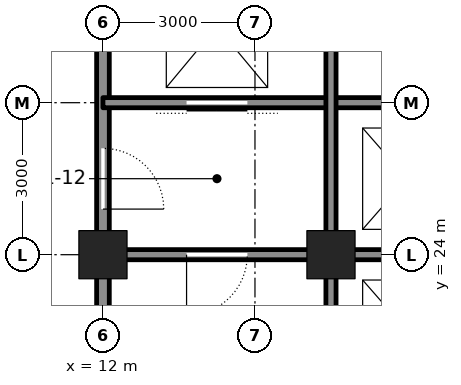
"""IFC4 building model, lengths in metres.
Left out: names, types, materials, properties, quantities, classifications, styles, units other than length and angle.
Written with IfcOpenShell. Run it as: python <this file> out.ifc"""

import sys

from ifc_helpers import new_model, si_unit, direction, frame, frame_2d, origin, origin_2d, place, context, subcontext, project, spatial, rectangle, hollow_rectangle, extrude, element, fill, save


model = new_model("IFC4")
c1 = context("Model", 3, precision=1e-05, world=origin(), true_north=direction((0.0, 1.0)))
c2 = subcontext(c1, "Body", "Model", "MODEL_VIEW")
j1 = project(units=[si_unit("LENGTHUNIT", "METRE"), si_unit("PLANEANGLEUNIT", "RADIAN")], contexts=[c1])
p1 = place(None, origin())
s1 = spatial("IfcSite", under=j1, at=p1, CompositionType="ELEMENT")
p2 = place(p1, origin())
s2 = spatial("IfcBuilding", under=s1, at=p2, CompositionType="ELEMENT")
p3 = place(p2, frame((0.0, 0.0, 6.0)))
s3 = spatial("IfcBuildingStorey", under=s2, at=p3, CompositionType="ELEMENT", Elevation=6.0)
for number, where, z_axis, x_axis in (
    (1, (12.0, 24.0, 0.0), (0.0, 0.0, 1.0), (1.0, 0.0, 0.0)),
    (2, (16.5, 24.0, 0.0), (0.0, 0.0, 1.0), (1.0, 0.0, 0.0)),
):
    element("IfcColumn", number, at=place(p3, frame(where, z_axis=z_axis, x_axis=x_axis)), inside=s3, PredefinedType="COLUMN", context=c2, shape_type="SweptSolid", body=[
        extrude(hollow_rectangle(XDim=0.95, YDim=0.95, WallThickness=0.095, at=origin_2d()), origin(), (0.0, 0.0, 1.0), 7.5),
    ])
p4 = place(p3, frame((12.0, 21.25, 0.0), z_axis=(0.0, 0.0, 1.0), x_axis=(0.0, 1.0, 0.0)))
e3 = element("IfcWall", 3, at=p4, inside=s3, PredefinedType="SOLIDWALL", context=c2, shape_type="SweptSolid", body=[
    extrude(rectangle(XDim=2.5, YDim=0.25, at=frame_2d((1.25, 0.0))), origin(), (0.0, 0.0, 1.0), 6.373),
])
p5 = place(p3, frame((12.0, 24.25, 0.0), z_axis=(0.0, 0.0, 1.0), x_axis=(0.0, 1.0, 0.0)))
e4 = element("IfcWall", 4, at=p5, inside=s3, PredefinedType="SOLIDWALL", context=c2, shape_type="SweptSolid", body=[
    extrude(rectangle(XDim=8.5, YDim=0.25, at=frame_2d((4.25, 0.0))), origin(), (0.0, 0.0, 1.0), 6.373),
])
p6 = place(p5, frame((0.65, 0.0, 0.0)))
e5 = element("IfcOpeningElement", 5, at=p6, cuts=e4, PredefinedType="OPENING", context=c2, shape_type="SweptSolid", body=[
    extrude(rectangle(XDim=1.2, YDim=2.1, at=frame_2d((0.6, 1.05))), frame((0.0, 0.135, 0.0), z_axis=(0.0, -1.0, 0.0), x_axis=(1.0, 0.0, 0.0)), (0.0, 0.0, 1.0), 0.27),
])
p7 = place(p5, frame((6.875, 0.0, 0.0)))
e6 = element("IfcOpeningElement", 6, at=p7, cuts=e4, PredefinedType="OPENING", context=c2, shape_type="SweptSolid", body=[
    extrude(rectangle(XDim=0.75, YDim=2.1, at=frame_2d((0.375, 1.05))), frame((0.0, 0.135, 0.0), z_axis=(0.0, -1.0, 0.0), x_axis=(1.0, 0.0, 0.0)), (0.0, 0.0, 1.0), 0.27),
])
p8 = place(p3, frame((12.25, 24.0, 0.0), z_axis=(0.0, 0.0, 1.0), x_axis=(1.0, 0.0, 0.0)))
e7 = element("IfcWall", 7, at=p8, inside=s3, PredefinedType="SOLIDWALL", context=c2, shape_type="SweptSolid", body=[
    extrude(rectangle(XDim=4.0, YDim=0.2, at=frame_2d((2.0, 0.0))), origin(), (0.0, 0.0, 1.0), 6.35),
])
p9 = place(p8, frame((1.4, 0.0, 0.0)))
e8 = element("IfcOpeningElement", 8, at=p9, cuts=e7, PredefinedType="OPENING", context=c2, shape_type="SweptSolid", body=[
    extrude(rectangle(XDim=1.2, YDim=2.1, at=frame_2d((0.6, 1.05))), frame((0.0, 0.11, 0.0), z_axis=(0.0, -1.0, 0.0), x_axis=(1.0, 0.0, 0.0)), (0.0, 0.0, 1.0), 0.22),
])
p10 = place(p3, frame((16.75, 24.0, 0.0), z_axis=(0.0, 0.0, 1.0), x_axis=(1.0, 0.0, 0.0)))
e9 = element("IfcWall", 9, at=p10, inside=s3, PredefinedType="SOLIDWALL", context=c2, shape_type="SweptSolid", body=[
    extrude(rectangle(XDim=2.75, YDim=0.2, at=frame_2d((1.375, 0.0))), origin(), (0.0, 0.0, 1.0), 6.35),
])
p11 = place(p3, frame((12.0, 27.0, 0.0), z_axis=(0.0, 0.0, 1.0), x_axis=(1.0, 0.0, 0.0)))
e10 = element("IfcWall", 10, at=p11, inside=s3, PredefinedType="SOLIDWALL", context=c2, shape_type="SweptSolid", body=[
    extrude(rectangle(XDim=7.5, YDim=0.2, at=frame_2d((3.75, 0.0))), origin(), (0.0, 0.0, 1.0), 7.3),
])
p12 = place(p11, frame((1.65, 0.0, 0.0)))
e11 = element("IfcOpeningElement", 11, at=p12, cuts=e10, PredefinedType="OPENING", context=c2, shape_type="SweptSolid", body=[
    extrude(rectangle(XDim=1.2, YDim=2.1, at=frame_2d((0.6, 1.05))), frame((0.0, 0.11, 0.0), z_axis=(0.0, -1.0, 0.0), x_axis=(1.0, 0.0, 0.0)), (0.0, 0.0, 1.0), 0.22),
])
p13 = place(p3, frame((16.5, 21.25, 0.0), z_axis=(0.0, 0.0, 1.0), x_axis=(0.0, 1.0, 0.0)))
e12 = element("IfcWall", 12, at=p13, inside=s3, PredefinedType="SOLIDWALL", context=c2, shape_type="SweptSolid", body=[
    extrude(rectangle(XDim=2.5, YDim=0.2, at=frame_2d((1.25, 0.0))), origin(), (0.0, 0.0, 1.0), 6.373),
])
p14 = place(p3, frame((16.5, 24.25, 0.0), z_axis=(0.0, 0.0, 1.0), x_axis=(0.0, 1.0, 0.0)))
e13 = element("IfcWall", 13, at=p14, inside=s3, PredefinedType="SOLIDWALL", context=c2, shape_type="SweptSolid", body=[
    extrude(rectangle(XDim=8.5, YDim=0.2, at=frame_2d((4.25, 0.0))), origin(), (0.0, 0.0, 1.0), 6.373),
])
p15 = place(p9, frame((1.2, 0.0, 0.0), z_axis=(0.0, 0.0, 1.0), x_axis=(-1.0, 0.0, 0.0)))
e14 = element("IfcDoor", 14, at=p15, inside=s3, OperationType="SINGLE_SWING_RIGHT", PredefinedType="DOOR", context=c2, shape_type="SweptSolid", body=[
    extrude(rectangle(XDim=1.2, YDim=2.1, at=frame_2d((0.6, 1.05))), frame((0.0, 0.025, 0.0), z_axis=(0.0, -1.0, 0.0), x_axis=(1.0, 0.0, 0.0)), (0.0, 0.0, 1.0), 0.05),
])
fill(e8, e14)
p16 = place(p6, frame((1.2, 0.0, 0.0), z_axis=(0.0, 0.0, 1.0), x_axis=(-1.0, 0.0, 0.0)))
e15 = element("IfcDoor", 15, at=p16, inside=s3, OperationType="SINGLE_SWING_RIGHT", PredefinedType="DOOR", context=c2, shape_type="SweptSolid", body=[
    extrude(rectangle(XDim=1.2, YDim=2.1, at=frame_2d((0.6, 1.05))), frame((0.0, 0.025, 0.0), z_axis=(0.0, -1.0, 0.0), x_axis=(1.0, 0.0, 0.0)), (0.0, 0.0, 1.0), 0.05),
])
fill(e5, e15)
p17 = place(p12, origin())
e16 = element("IfcDoor", 16, at=p17, inside=s3, OperationType="DOUBLE_DOOR_SLIDING", PredefinedType="DOOR", context=c2, shape_type="SweptSolid", body=[
    extrude(rectangle(XDim=1.2, YDim=2.1, at=frame_2d((0.6, 1.05))), frame((0.0, 0.025, 0.0), z_axis=(0.0, -1.0, 0.0), x_axis=(1.0, 0.0, 0.0)), (0.0, 0.0, 1.0), 0.05),
])
fill(e11, e16)
save(model, sys.argv[1])
